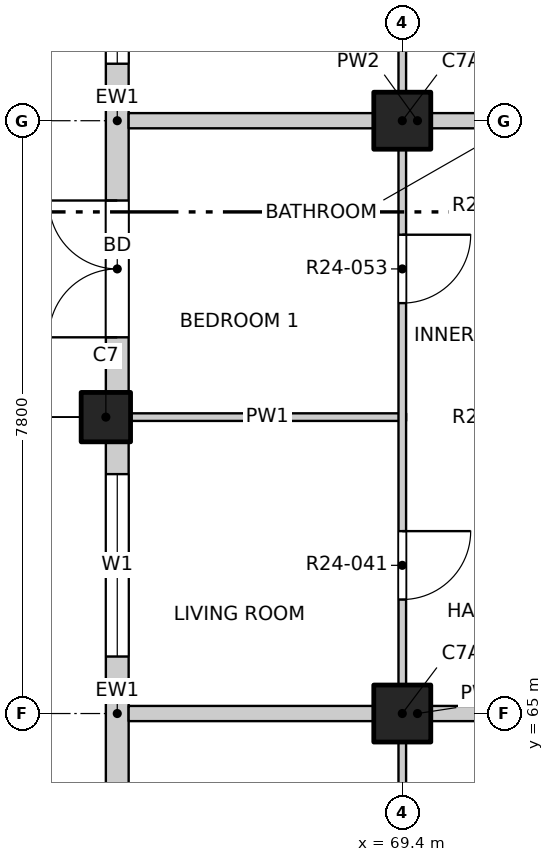
"""IFC4 building model, lengths in metres.
Left out: names, types, materials, properties, quantities, classifications, styles, units other than length and angle.
Written with IfcOpenShell. Run it as: python <this file> out.ifc"""

import sys

from ifc_helpers import new_model, si_unit, direction, frame, frame_2d, origin, origin_2d, place, context, subcontext, project, spatial, rectangle, extrude, element, fill, save


model = new_model("IFC4")
c1 = context("Model", 3, precision=1e-05, world=origin(), true_north=direction((0.0, 1.0)))
c2 = subcontext(c1, "Body", "Model", "MODEL_VIEW")
j1 = project(units=[si_unit("LENGTHUNIT", "METRE"), si_unit("PLANEANGLEUNIT", "RADIAN")], contexts=[c1])
p1 = place(None, origin())
s1 = spatial("IfcSite", under=j1, at=p1, CompositionType="ELEMENT")
p2 = place(p1, origin())
s2 = spatial("IfcBuilding", under=s1, at=p2, CompositionType="ELEMENT")
p3 = place(p2, frame((0.0, 0.0, 249.4)))
s3 = spatial("IfcBuildingStorey", under=s2, at=p3, CompositionType="ELEMENT", Elevation=249.4)
p4 = place(p3, frame((65.5, 68.9, -0.25), z_axis=(0.0, 0.0, 1.0), x_axis=(1.0, 0.0, 0.0)))
e1 = element("IfcColumn", 1, at=p4, inside=s3, PredefinedType="COLUMN", context=c2, shape_type="SweptSolid", body=[
    extrude(rectangle(XDim=0.65, YDim=0.65, at=origin_2d()), origin(), (0.0, 0.0, 1.0), 3.4),
])
for number, where, z_axis, x_axis in (
    (2, (69.4, 65.0, -0.25), (0.0, 0.0, 1.0), (1.0, 0.0, 0.0)),
    (3, (69.4, 72.8, -0.25), (0.0, 0.0, 1.0), (1.0, 0.0, 0.0)),
):
    element("IfcColumn", number, at=place(p3, frame(where, z_axis=z_axis, x_axis=x_axis)), inside=s3, PredefinedType="COLUMN", context=c2, shape_type="SweptSolid", body=[
        extrude(rectangle(XDim=0.75, YDim=0.75, at=origin_2d()), origin(), (0.0, 0.0, 1.0), 3.4),
    ])
p5 = place(p3, frame((65.65, 61.425, 0.0), z_axis=(0.0, 0.0, 1.0), x_axis=(0.0, 1.0, 0.0)))
e4 = element("IfcWall", 4, at=p5, inside=s3, PredefinedType="SOLIDWALL", context=c2, shape_type="SweptSolid", body=[
    extrude(rectangle(XDim=7.15, YDim=0.3, at=frame_2d((3.575, 0.0))), origin(), (0.0, 0.0, 1.0), 2.7),
])
p6 = place(p5, frame((0.725, 0.0, 0.0)))
e5 = element("IfcOpeningElement", 5, at=p6, cuts=e4, PredefinedType="OPENING", context=c2, shape_type="SweptSolid", body=[
    extrude(rectangle(XDim=1.8, YDim=2.4, at=frame_2d((0.9, 1.2))), frame((0.0, 0.16, 0.0), z_axis=(0.0, -1.0, 0.0), x_axis=(1.0, 0.0, 0.0)), (0.0, 0.0, 1.0), 0.32),
])
p7 = place(p5, frame((4.325, 0.0, 0.9)))
e6 = element("IfcOpeningElement", 6, at=p7, cuts=e4, PredefinedType="OPENING", context=c2, shape_type="SweptSolid", body=[
    extrude(rectangle(XDim=2.4, YDim=1.8, at=frame_2d((1.2, 0.9))), frame((0.0, 0.16, 0.0), z_axis=(0.0, -1.0, 0.0), x_axis=(1.0, 0.0, 0.0)), (0.0, 0.0, 1.0), 0.32),
])
p8 = place(p3, frame((65.65, 69.225, 0.0), z_axis=(0.0, 0.0, 1.0), x_axis=(0.0, 1.0, 0.0)))
e7 = element("IfcWall", 7, at=p8, inside=s3, PredefinedType="SOLIDWALL", context=c2, shape_type="SweptSolid", body=[
    extrude(rectangle(XDim=7.15, YDim=0.3, at=frame_2d((3.575, 0.0))), origin(), (0.0, 0.0, 1.0), 2.7),
])
p9 = place(p8, frame((0.725, 0.0, 0.0)))
e8 = element("IfcOpeningElement", 8, at=p9, cuts=e7, PredefinedType="OPENING", context=c2, shape_type="SweptSolid", body=[
    extrude(rectangle(XDim=1.8, YDim=2.4, at=frame_2d((0.9, 1.2))), frame((0.0, 0.16, 0.0), z_axis=(0.0, -1.0, 0.0), x_axis=(1.0, 0.0, 0.0)), (0.0, 0.0, 1.0), 0.32),
])
p10 = place(p8, frame((4.325, 0.0, 0.9)))
e9 = element("IfcOpeningElement", 9, at=p10, cuts=e7, PredefinedType="OPENING", context=c2, shape_type="SweptSolid", body=[
    extrude(rectangle(XDim=2.4, YDim=1.8, at=frame_2d((1.2, 0.9))), frame((0.0, 0.16, 0.0), z_axis=(0.0, -1.0, 0.0), x_axis=(1.0, 0.0, 0.0)), (0.0, 0.0, 1.0), 0.32),
])
p11 = place(p3, frame((65.8, 65.0, 0.0), z_axis=(0.0, 0.0, 1.0), x_axis=(1.0, 0.0, 0.0)))
e10 = element("IfcWall", 10, at=p11, inside=s3, PredefinedType="PARTITIONING", context=c2, shape_type="SweptSolid", body=[
    extrude(rectangle(XDim=7.6, YDim=0.2, at=frame_2d((3.8, 0.0))), origin(), (0.0, 0.0, 1.0), 3.15),
])
p12 = place(p3, frame((65.8, 68.9, 0.0), z_axis=(0.0, 0.0, 1.0), x_axis=(1.0, 0.0, 0.0)))
e11 = element("IfcWall", 11, at=p12, inside=s3, PredefinedType="PARTITIONING", context=c2, shape_type="SweptSolid", body=[
    extrude(rectangle(XDim=3.65, YDim=0.1, at=frame_2d((1.825, 0.0))), origin(), (0.0, 0.0, 1.0), 2.55),
])
p13 = place(p3, frame((65.8, 72.8, 0.0), z_axis=(0.0, 0.0, 1.0), x_axis=(1.0, 0.0, 0.0)))
e12 = element("IfcWall", 12, at=p13, inside=s3, PredefinedType="PARTITIONING", context=c2, shape_type="SweptSolid", body=[
    extrude(rectangle(XDim=7.6, YDim=0.2, at=frame_2d((3.8, 0.0))), origin(), (0.0, 0.0, 1.0), 3.15),
])
p14 = place(p3, frame((69.4, 45.8, 0.0), z_axis=(0.0, 0.0, 1.0), x_axis=(0.0, 1.0, 0.0)))
e13 = element("IfcWall", 13, at=p14, inside=s3, PredefinedType="PARTITIONING", context=c2, shape_type="SweptSolid", body=[
    extrude(rectangle(XDim=38.4, YDim=0.1, at=frame_2d((19.2, 0.0))), origin(), (0.0, 0.0, 1.0), 3.15),
])
p15 = place(p14, frame((1.05, 0.0, 0.0)))
e14 = element("IfcOpeningElement", 14, at=p15, cuts=e13, PredefinedType="OPENING", context=c2, shape_type="SweptSolid", body=[
    extrude(rectangle(XDim=1.2, YDim=2.1, at=frame_2d((0.6, 1.05))), frame((0.0, 0.06, 0.0), z_axis=(0.0, -1.0, 0.0), x_axis=(1.0, 0.0, 0.0)), (0.0, 0.0, 1.0), 0.12),
])
p16 = place(p14, frame((5.1, 0.0, 0.0)))
e15 = element("IfcOpeningElement", 15, at=p16, cuts=e13, PredefinedType="OPENING", context=c2, shape_type="SweptSolid", body=[
    extrude(rectangle(XDim=0.9, YDim=2.1, at=frame_2d((0.45, 1.05))), frame((0.0, 0.06, 0.0), z_axis=(0.0, -1.0, 0.0), x_axis=(1.0, 0.0, 0.0)), (0.0, 0.0, 1.0), 0.12),
])
p17 = place(p14, frame((9.0, 0.0, 0.0)))
e16 = element("IfcOpeningElement", 16, at=p17, cuts=e13, PredefinedType="OPENING", context=c2, shape_type="SweptSolid", body=[
    extrude(rectangle(XDim=0.9, YDim=2.1, at=frame_2d((0.45, 1.05))), frame((0.0, 0.06, 0.0), z_axis=(0.0, -1.0, 0.0), x_axis=(1.0, 0.0, 0.0)), (0.0, 0.0, 1.0), 0.12),
])
p18 = place(p14, frame((12.9, 0.0, 0.0)))
e17 = element("IfcOpeningElement", 17, at=p18, cuts=e13, PredefinedType="OPENING", context=c2, shape_type="SweptSolid", body=[
    extrude(rectangle(XDim=0.9, YDim=2.1, at=frame_2d((0.45, 1.05))), frame((0.0, 0.06, 0.0), z_axis=(0.0, -1.0, 0.0), x_axis=(1.0, 0.0, 0.0)), (0.0, 0.0, 1.0), 0.12),
])
p19 = place(p14, frame((16.8, 0.0, 0.0)))
e18 = element("IfcOpeningElement", 18, at=p19, cuts=e13, PredefinedType="OPENING", context=c2, shape_type="SweptSolid", body=[
    extrude(rectangle(XDim=0.9, YDim=2.1, at=frame_2d((0.45, 1.05))), frame((0.0, 0.06, 0.0), z_axis=(0.0, -1.0, 0.0), x_axis=(1.0, 0.0, 0.0)), (0.0, 0.0, 1.0), 0.12),
])
p20 = place(p14, frame((20.7, 0.0, 0.0)))
e19 = element("IfcOpeningElement", 19, at=p20, cuts=e13, PredefinedType="OPENING", context=c2, shape_type="SweptSolid", body=[
    extrude(rectangle(XDim=0.9, YDim=2.1, at=frame_2d((0.45, 1.05))), frame((0.0, 0.06, 0.0), z_axis=(0.0, -1.0, 0.0), x_axis=(1.0, 0.0, 0.0)), (0.0, 0.0, 1.0), 0.12),
])
p21 = place(p14, frame((24.6, 0.0, 0.0)))
e20 = element("IfcOpeningElement", 20, at=p21, cuts=e13, PredefinedType="OPENING", context=c2, shape_type="SweptSolid", body=[
    extrude(rectangle(XDim=0.9, YDim=2.1, at=frame_2d((0.45, 1.05))), frame((0.0, 0.06, 0.0), z_axis=(0.0, -1.0, 0.0), x_axis=(1.0, 0.0, 0.0)), (0.0, 0.0, 1.0), 0.12),
])
p22 = place(p14, frame((30.3, 0.0, 0.0)))
e21 = element("IfcOpeningElement", 21, at=p22, cuts=e13, PredefinedType="OPENING", context=c2, shape_type="SweptSolid", body=[
    extrude(rectangle(XDim=1.2, YDim=2.1, at=frame_2d((0.6, 1.05))), frame((0.0, 0.06, 0.0), z_axis=(0.0, -1.0, 0.0), x_axis=(1.0, 0.0, 0.0)), (0.0, 0.0, 1.0), 0.12),
])
p23 = place(p14, frame((36.15, 0.0, 0.0)))
e22 = element("IfcOpeningElement", 22, at=p23, cuts=e13, PredefinedType="OPENING", context=c2, shape_type="SweptSolid", body=[
    extrude(rectangle(XDim=1.2, YDim=2.1, at=frame_2d((0.6, 1.05))), frame((0.0, 0.06, 0.0), z_axis=(0.0, -1.0, 0.0), x_axis=(1.0, 0.0, 0.0)), (0.0, 0.0, 1.0), 0.12),
])
p24 = place(p7, origin())
e23 = element("IfcWindow", 23, at=p24, inside=s3, PartitioningType="DOUBLE_PANEL_VERTICAL", PredefinedType="WINDOW", context=c2, shape_type="SweptSolid", body=[
    extrude(rectangle(XDim=2.4, YDim=1.8, at=frame_2d((1.2, 0.9))), frame((0.0, 0.03, 0.0), z_axis=(0.0, -1.0, 0.0), x_axis=(1.0, 0.0, 0.0)), (0.0, 0.0, 1.0), 0.06),
])
fill(e6, e23)
p25 = place(p9, origin())
e24 = element("IfcDoor", 24, at=p25, inside=s3, OperationType="DOUBLE_DOOR_SINGLE_SWING", PredefinedType="DOOR", context=c2, shape_type="SweptSolid", body=[
    extrude(rectangle(XDim=1.8, YDim=2.4, at=frame_2d((0.9, 1.2))), frame((0.0, 0.025, 0.0), z_axis=(0.0, -1.0, 0.0), x_axis=(1.0, 0.0, 0.0)), (0.0, 0.0, 1.0), 0.05),
])
fill(e8, e24)
p26 = place(p10, origin())
e25 = element("IfcWindow", 25, at=p26, inside=s3, PartitioningType="DOUBLE_PANEL_VERTICAL", PredefinedType="WINDOW", context=c2, shape_type="SweptSolid", body=[
    extrude(rectangle(XDim=2.4, YDim=1.8, at=frame_2d((1.2, 0.9))), frame((0.0, 0.03, 0.0), z_axis=(0.0, -1.0, 0.0), x_axis=(1.0, 0.0, 0.0)), (0.0, 0.0, 1.0), 0.06),
])
fill(e9, e25)
p27 = place(p20, origin())
e26 = element("IfcDoor", 26, at=p27, inside=s3, OperationType="SINGLE_SWING_LEFT", PredefinedType="DOOR", context=c2, shape_type="SweptSolid", body=[
    extrude(rectangle(XDim=0.9, YDim=2.1, at=frame_2d((0.45, 1.05))), frame((0.0, 0.025, 0.0), z_axis=(0.0, -1.0, 0.0), x_axis=(1.0, 0.0, 0.0)), (0.0, 0.0, 1.0), 0.05),
])
fill(e19, e26)
p28 = place(p21, origin())
e27 = element("IfcDoor", 27, at=p28, inside=s3, OperationType="SINGLE_SWING_LEFT", PredefinedType="DOOR", context=c2, shape_type="SweptSolid", body=[
    extrude(rectangle(XDim=0.9, YDim=2.1, at=frame_2d((0.45, 1.05))), frame((0.0, 0.025, 0.0), z_axis=(0.0, -1.0, 0.0), x_axis=(1.0, 0.0, 0.0)), (0.0, 0.0, 1.0), 0.05),
])
fill(e20, e27)
save(model, sys.argv[1])
